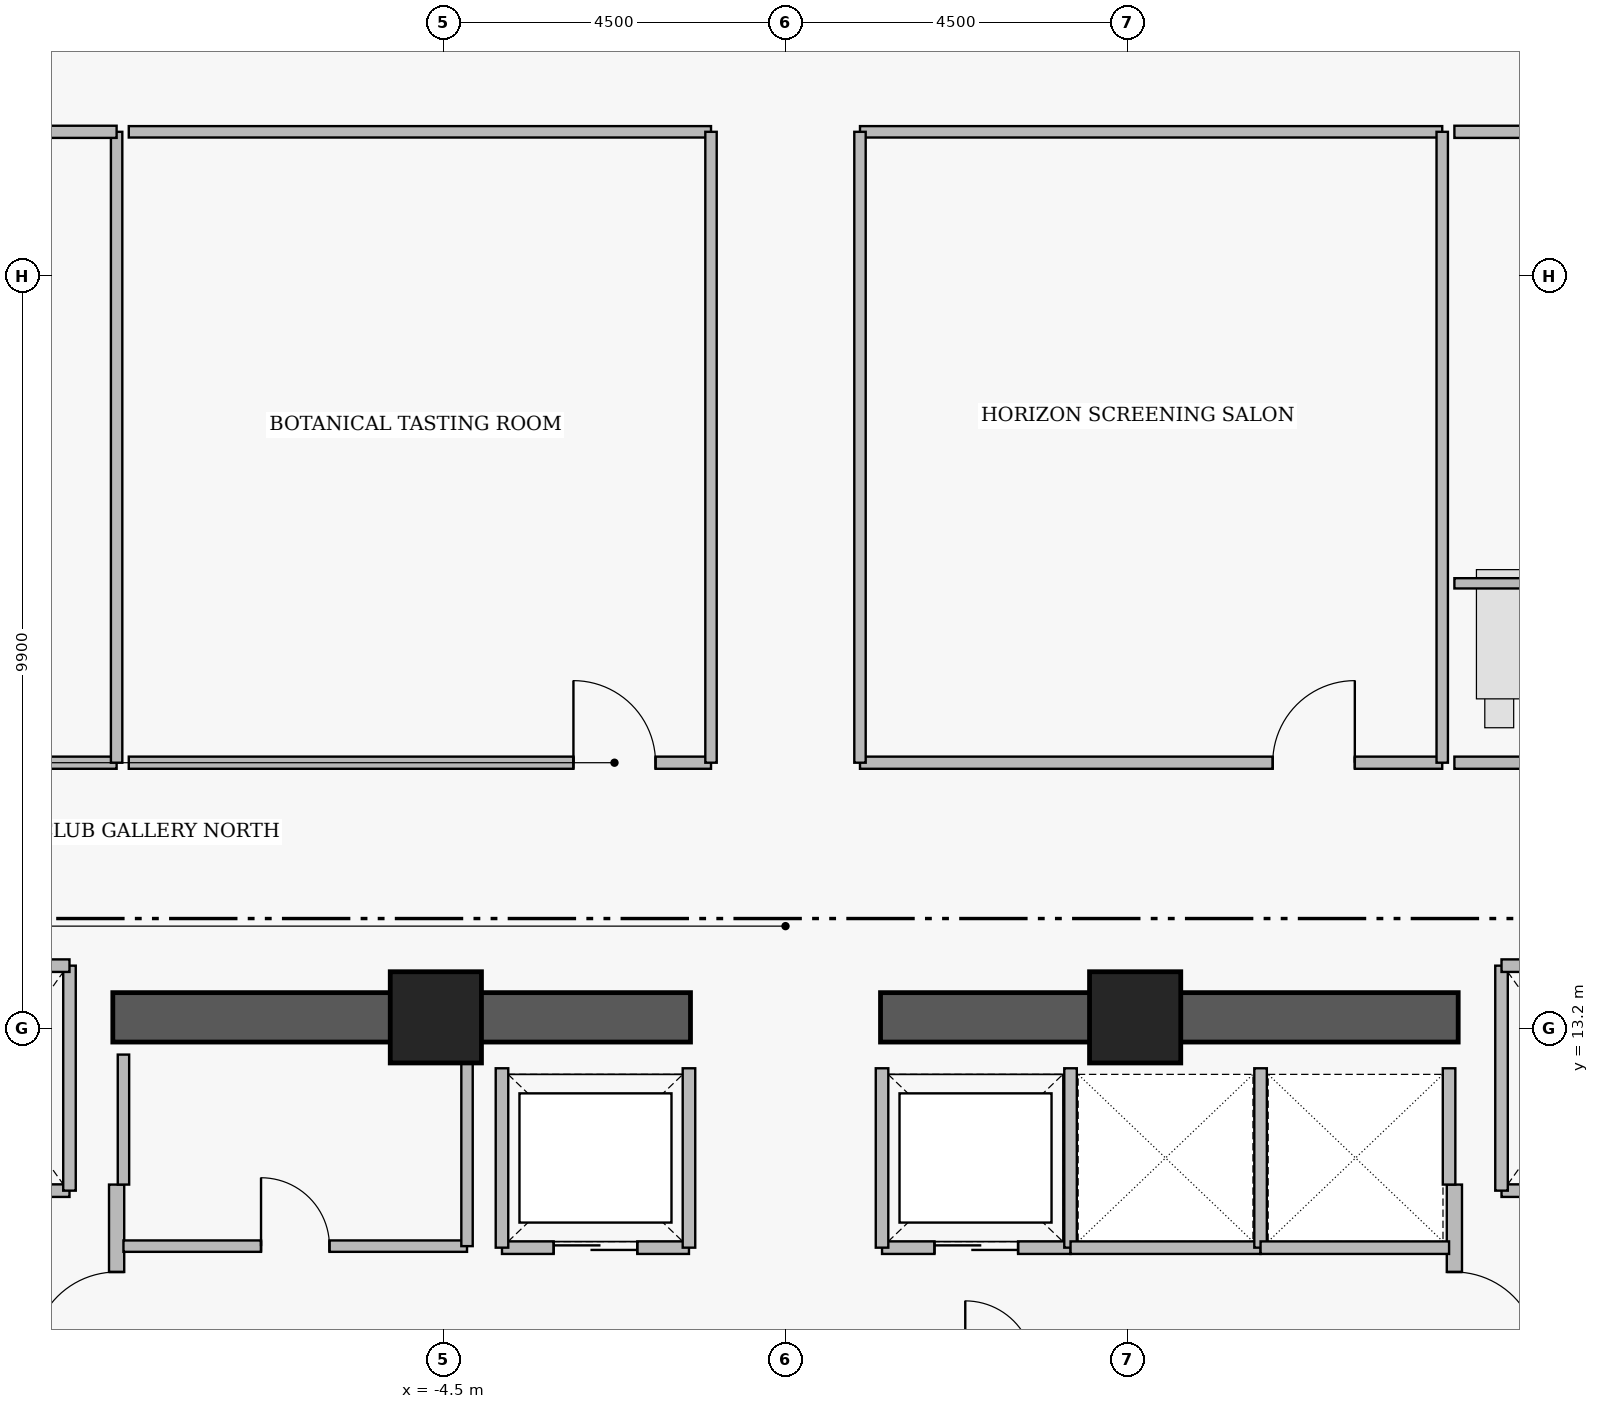
"""IFC4 building model, lengths in metres.
Left out: names, types, materials, properties, quantities, classifications, styles, units other than length and angle.
Written with IfcOpenShell. Run it as: python <this file> out.ifc"""

import sys

from ifc_helpers import new_model, si_unit, direction, frame, frame_2d, origin, origin_2d, place, context, subcontext, project, spatial, rectangle, extrude, element, fill, save


model = new_model("IFC4")
c1 = context("Model", 3, precision=1e-05, world=origin(), true_north=direction((0.0, 1.0)))
c2 = subcontext(c1, "Body", "Model", "MODEL_VIEW")
j1 = project(units=[si_unit("LENGTHUNIT", "METRE"), si_unit("PLANEANGLEUNIT", "RADIAN")], contexts=[c1])
p1 = place(None, origin())
s1 = spatial("IfcSite", under=j1, at=p1, CompositionType="ELEMENT")
p2 = place(p1, origin())
s2 = spatial("IfcBuilding", under=s1, at=p2, CompositionType="ELEMENT")
p3 = place(p2, frame((0.0, 0.0, 199.9)))
s3 = spatial("IfcBuildingStorey", under=s2, at=p3, CompositionType="ELEMENT", Elevation=199.9)
for number, where, z_axis, x_axis in (
    (1, (-8.85, 13.35, 0.0), (0.0, 0.0, 1.0), (1.0, 0.0, 0.0)),
    (2, (1.25, 13.35, 0.0), (0.0, 0.0, 1.0), (1.0, 0.0, 0.0)),
):
    element("IfcWall", number, at=place(p3, frame(where, z_axis=z_axis, x_axis=x_axis)), inside=s3, PredefinedType="SHEAR", context=c2, shape_type="SweptSolid", body=[
        extrude(rectangle(XDim=7.6, YDim=0.65, at=frame_2d((3.8, 0.0))), origin(), (0.0, 0.0, 1.0), 3.53),
    ])
for number, where, z_axis, x_axis in (
    (3, (-4.6, 13.35, 0.0), (0.0, 0.0, 1.0), (1.0, 0.0, 0.0)),
    (4, (4.6, 13.35, 0.0), (0.0, 0.0, 1.0), (1.0, 0.0, 0.0)),
):
    element("IfcColumn", number, at=place(p3, frame(where, z_axis=z_axis, x_axis=x_axis)), inside=s3, PredefinedType="COLUMN", context=c2, shape_type="SweptSolid", body=[
        extrude(rectangle(XDim=1.2, YDim=1.2, at=origin_2d()), origin(), (0.0, 0.0, 1.0), 3.75),
    ])
p4 = place(p3, frame((-8.8, 5.05, 0.0), z_axis=(0.0, 0.0, 1.0), x_axis=(0.0, 1.0, 0.0)))
e5 = element("IfcWall", 5, at=p4, inside=s3, PredefinedType="PARTITIONING", context=c2, shape_type="SweptSolid", body=[
    extrude(rectangle(XDim=6.1, YDim=0.2, at=frame_2d((3.05, 0.0))), origin(), (0.0, 0.0, 1.0), 3.53),
])
p5 = place(p4, frame((0.25, 0.0, 0.0)))
e6 = element("IfcOpeningElement", 6, at=p5, cuts=e5, PredefinedType="OPENING", context=c2, shape_type="SweptSolid", body=[
    extrude(rectangle(XDim=1.1, YDim=2.2, at=frame_2d((0.55, 1.1))), frame((0.0, 0.11, 0.0), z_axis=(0.0, -1.0, 0.0), x_axis=(1.0, 0.0, 0.0)), (0.0, 0.0, 1.0), 0.22),
])
p6 = place(p4, frame((3.85, 0.0, 0.0)))
e7 = element("IfcOpeningElement", 7, at=p6, cuts=e5, PredefinedType="OPENING", context=c2, shape_type="SweptSolid", body=[
    extrude(rectangle(XDim=1.1, YDim=2.2, at=frame_2d((0.55, 1.1))), frame((0.0, 0.11, 0.0), z_axis=(0.0, -1.0, 0.0), x_axis=(1.0, 0.0, 0.0)), (0.0, 0.0, 1.0), 0.22),
])
p7 = place(p3, frame((8.8, 11.15, 0.0), z_axis=(0.0, 0.0, 1.0), x_axis=(0.0, -1.0, 0.0)))
e8 = element("IfcWall", 8, at=p7, inside=s3, PredefinedType="PARTITIONING", context=c2, shape_type="SweptSolid", body=[
    extrude(rectangle(XDim=6.1, YDim=0.2, at=frame_2d((3.05, 0.0))), origin(), (0.0, 0.0, 1.0), 3.53),
])
p8 = place(p7, frame((1.15, 0.0, 0.0)))
e9 = element("IfcOpeningElement", 9, at=p8, cuts=e8, PredefinedType="OPENING", context=c2, shape_type="SweptSolid", body=[
    extrude(rectangle(XDim=1.1, YDim=2.2, at=frame_2d((0.55, 1.1))), frame((0.0, 0.11, 0.0), z_axis=(0.0, -1.0, 0.0), x_axis=(1.0, 0.0, 0.0)), (0.0, 0.0, 1.0), 0.22),
])
p9 = place(p7, frame((4.75, 0.0, 0.0)))
e10 = element("IfcOpeningElement", 10, at=p9, cuts=e8, PredefinedType="OPENING", context=c2, shape_type="SweptSolid", body=[
    extrude(rectangle(XDim=1.1, YDim=2.2, at=frame_2d((0.55, 1.1))), frame((0.0, 0.11, 0.0), z_axis=(0.0, -1.0, 0.0), x_axis=(1.0, 0.0, 0.0)), (0.0, 0.0, 1.0), 0.22),
])
p10 = place(p3, frame((-11.58, 11.07, 0.0), z_axis=(0.0, 0.0, 1.0), x_axis=(1.0, 0.0, 0.0)))
e11 = element("IfcWall", 11, at=p10, inside=s3, PredefinedType="PARTITIONING", context=c2, shape_type="SweptSolid", body=[
    extrude(rectangle(XDim=2.16, YDim=0.165, at=frame_2d((1.08, 0.0))), origin(), (0.0, 0.0, 1.0), 3.53),
])
p11 = place(p10, frame((0.53, 0.0, 0.0)))
e12 = element("IfcOpeningElement", 12, at=p11, cuts=e11, PredefinedType="OPENING", context=c2, shape_type="SweptSolid", body=[
    extrude(rectangle(XDim=1.15, YDim=2.25, at=frame_2d((0.575, 1.125))), frame((0.0, 0.093, 0.0), z_axis=(0.0, -1.0, 0.0), x_axis=(1.0, 0.0, 0.0)), (0.0, 0.0, 1.0), 0.185),
])
p12 = place(p3, frame((9.42, 11.07, 0.0), z_axis=(0.0, 0.0, 1.0), x_axis=(1.0, 0.0, 0.0)))
e13 = element("IfcWall", 13, at=p12, inside=s3, PredefinedType="PARTITIONING", context=c2, shape_type="SweptSolid", body=[
    extrude(rectangle(XDim=2.16, YDim=0.165, at=frame_2d((1.08, 0.0))), origin(), (0.0, 0.0, 1.0), 3.53),
])
p13 = place(p12, frame((0.53, 0.0, 0.0)))
e14 = element("IfcOpeningElement", 14, at=p13, cuts=e13, PredefinedType="OPENING", context=c2, shape_type="SweptSolid", body=[
    extrude(rectangle(XDim=1.15, YDim=2.25, at=frame_2d((0.575, 1.125))), frame((0.0, 0.093, 0.0), z_axis=(0.0, -1.0, 0.0), x_axis=(1.0, 0.0, 0.0)), (0.0, 0.0, 1.0), 0.185),
])
p14 = place(p3, frame((-3.73, 10.32, 0.0), z_axis=(0.0, 0.0, 1.0), x_axis=(1.0, 0.0, 0.0)))
e15 = element("IfcWall", 15, at=p14, inside=s3, PredefinedType="PARTITIONING", context=c2, shape_type="SweptSolid", body=[
    extrude(rectangle(XDim=2.46, YDim=0.165, at=frame_2d((1.23, 0.0))), origin(), (0.0, 0.0, 1.0), 3.53),
])
p15 = place(p14, frame((0.68, 0.0, 0.0)))
e16 = element("IfcOpeningElement", 16, at=p15, cuts=e15, PredefinedType="OPENING", context=c2, shape_type="SweptSolid", body=[
    extrude(rectangle(XDim=1.1, YDim=2.25, at=frame_2d((0.55, 1.125))), frame((0.0, 0.093, 0.0), z_axis=(0.0, -1.0, 0.0), x_axis=(1.0, 0.0, 0.0)), (0.0, 0.0, 1.0), 0.185),
])
p16 = place(p3, frame((1.27, 10.32, 0.0), z_axis=(0.0, 0.0, 1.0), x_axis=(1.0, 0.0, 0.0)))
e17 = element("IfcWall", 17, at=p16, inside=s3, PredefinedType="PARTITIONING", context=c2, shape_type="SweptSolid", body=[
    extrude(rectangle(XDim=2.48, YDim=0.165, at=frame_2d((1.24, 0.0))), origin(), (0.0, 0.0, 1.0), 3.53),
])
p17 = place(p16, frame((0.69, 0.0, 0.0)))
e18 = element("IfcOpeningElement", 18, at=p17, cuts=e17, PredefinedType="OPENING", context=c2, shape_type="SweptSolid", body=[
    extrude(rectangle(XDim=1.1, YDim=2.25, at=frame_2d((0.55, 1.125))), frame((0.0, 0.093, 0.0), z_axis=(0.0, -1.0, 0.0), x_axis=(1.0, 0.0, 0.0)), (0.0, 0.0, 1.0), 0.185),
])
p18 = place(p3, frame((-8.71, 10.34, 0.0), z_axis=(0.0, 0.0, 1.0), x_axis=(1.0, 0.0, 0.0)))
e19 = element("IfcWall", 19, at=p18, inside=s3, PredefinedType="PARTITIONING", context=c2, shape_type="SweptSolid", body=[
    extrude(rectangle(XDim=4.52, YDim=0.15, at=frame_2d((2.26, 0.0))), origin(), (0.0, 0.0, 1.0), 3.53),
])
p19 = place(p18, frame((1.81, 0.0, 0.0)))
e20 = element("IfcOpeningElement", 20, at=p19, cuts=e19, PredefinedType="OPENING", context=c2, shape_type="SweptSolid", body=[
    extrude(rectangle(XDim=0.9, YDim=2.15, at=frame_2d((0.45, 1.075))), frame((0.0, 0.085, 0.0), z_axis=(0.0, -1.0, 0.0), x_axis=(1.0, 0.0, 0.0)), (0.0, 0.0, 1.0), 0.17),
])
p20 = place(p3, frame((-22.04, 16.7, 0.0), z_axis=(0.0, 0.0, 1.0), x_axis=(1.0, 0.0, 0.0)))
e21 = element("IfcWall", 21, at=p20, inside=s3, PredefinedType="PARTITIONING", context=c2, shape_type="SweptSolid", body=[
    extrude(rectangle(XDim=13.24, YDim=0.16, at=frame_2d((6.62, 0.0))), origin(), (0.0, 0.0, 1.0), 3.124),
])
p21 = place(p20, frame((7.365, 0.0, 0.0)))
e22 = element("IfcOpeningElement", 22, at=p21, cuts=e21, PredefinedType="OPENING", context=c2, shape_type="SweptSolid", body=[
    extrude(rectangle(XDim=1.0, YDim=2.15, at=frame_2d((0.5, 1.075))), frame((0.0, 0.09, 0.0), z_axis=(0.0, -1.0, 0.0), x_axis=(1.0, 0.0, 0.0)), (0.0, 0.0, 1.0), 0.18),
])
p22 = place(p3, frame((-8.64, 16.7, 0.0), z_axis=(0.0, 0.0, 1.0), x_axis=(1.0, 0.0, 0.0)))
e23 = element("IfcWall", 23, at=p22, inside=s3, PredefinedType="PARTITIONING", context=c2, shape_type="SweptSolid", body=[
    extrude(rectangle(XDim=7.66, YDim=0.16, at=frame_2d((3.83, 0.0))), origin(), (0.0, 0.0, 1.0), 3.124),
])
p23 = place(p22, frame((5.85, 0.0, 0.0)))
e24 = element("IfcOpeningElement", 24, at=p23, cuts=e23, PredefinedType="OPENING", context=c2, shape_type="SweptSolid", body=[
    extrude(rectangle(XDim=1.08, YDim=2.18, at=frame_2d((0.54, 1.09))), frame((0.0, 0.09, 0.0), z_axis=(0.0, -1.0, 0.0), x_axis=(1.0, 0.0, 0.0)), (0.0, 0.0, 1.0), 0.18),
])
p24 = place(p3, frame((0.98, 16.7, 0.0), z_axis=(0.0, 0.0, 1.0), x_axis=(1.0, 0.0, 0.0)))
e25 = element("IfcWall", 25, at=p24, inside=s3, PredefinedType="PARTITIONING", context=c2, shape_type="SweptSolid", body=[
    extrude(rectangle(XDim=7.66, YDim=0.16, at=frame_2d((3.83, 0.0))), origin(), (0.0, 0.0, 1.0), 3.124),
])
p25 = place(p24, frame((5.43, 0.0, 0.0)))
e26 = element("IfcOpeningElement", 26, at=p25, cuts=e25, PredefinedType="OPENING", context=c2, shape_type="SweptSolid", body=[
    extrude(rectangle(XDim=1.08, YDim=2.18, at=frame_2d((0.54, 1.09))), frame((0.0, 0.09, 0.0), z_axis=(0.0, -1.0, 0.0), x_axis=(1.0, 0.0, 0.0)), (0.0, 0.0, 1.0), 0.18),
])
p26 = place(p3, frame((8.8, 16.7, 0.0), z_axis=(0.0, 0.0, 1.0), x_axis=(1.0, 0.0, 0.0)))
e27 = element("IfcWall", 27, at=p26, inside=s3, PredefinedType="PARTITIONING", context=c2, shape_type="SweptSolid", body=[
    extrude(rectangle(XDim=13.24, YDim=0.16, at=frame_2d((6.62, 0.0))), origin(), (0.0, 0.0, 1.0), 3.124),
])
p27 = place(p26, frame((6.025, 0.0, 0.0)))
e28 = element("IfcOpeningElement", 28, at=p27, cuts=e27, PredefinedType="OPENING", context=c2, shape_type="SweptSolid", body=[
    extrude(rectangle(XDim=1.0, YDim=2.15, at=frame_2d((0.5, 1.075))), frame((0.0, 0.09, 0.0), z_axis=(0.0, -1.0, 0.0), x_axis=(1.0, 0.0, 0.0)), (0.0, 0.0, 1.0), 0.18),
])
p28 = place(p3, frame((-9.42, 11.07, 0.0), z_axis=(0.0, 0.0, 1.0), x_axis=(0.0, 1.0, 0.0)))
e29 = element("IfcWall", 29, at=p28, inside=s3, PredefinedType="PARTITIONING", context=c2, shape_type="SweptSolid", body=[
    extrude(rectangle(XDim=2.96, YDim=0.165, at=frame_2d((1.48, 0.0))), origin(), (0.0, 0.0, 1.0), 3.53),
])
p29 = place(p3, frame((-11.58, 14.03, 0.0), z_axis=(0.0, 0.0, 1.0), x_axis=(1.0, 0.0, 0.0)))
e30 = element("IfcWall", 30, at=p29, inside=s3, PredefinedType="PARTITIONING", context=c2, shape_type="SweptSolid", body=[
    extrude(rectangle(XDim=2.16, YDim=0.165, at=frame_2d((1.08, 0.0))), origin(), (0.0, 0.0, 1.0), 3.53),
])
p30 = place(p3, frame((9.42, 11.07, 0.0), z_axis=(0.0, 0.0, 1.0), x_axis=(0.0, 1.0, 0.0)))
e31 = element("IfcWall", 31, at=p30, inside=s3, PredefinedType="PARTITIONING", context=c2, shape_type="SweptSolid", body=[
    extrude(rectangle(XDim=2.96, YDim=0.165, at=frame_2d((1.48, 0.0))), origin(), (0.0, 0.0, 1.0), 3.53),
])
p31 = place(p3, frame((9.42, 14.03, 0.0), z_axis=(0.0, 0.0, 1.0), x_axis=(1.0, 0.0, 0.0)))
e32 = element("IfcWall", 32, at=p31, inside=s3, PredefinedType="PARTITIONING", context=c2, shape_type="SweptSolid", body=[
    extrude(rectangle(XDim=2.16, YDim=0.165, at=frame_2d((1.08, 0.0))), origin(), (0.0, 0.0, 1.0), 3.53),
])
for number, where, z_axis, x_axis in (
    (33, (-3.73, 10.32, 0.0), (0.0, 0.0, 1.0), (0.0, 1.0, 0.0)),
    (34, (-1.27, 10.32, 0.0), (0.0, 0.0, 1.0), (0.0, 1.0, 0.0)),
    (35, (1.27, 10.32, 0.0), (0.0, 0.0, 1.0), (0.0, 1.0, 0.0)),
    (36, (3.75, 10.32, 0.0), (0.0, 0.0, 1.0), (0.0, 1.0, 0.0)),
):
    element("IfcWall", number, at=place(p3, frame(where, z_axis=z_axis, x_axis=x_axis)), inside=s3, PredefinedType="PARTITIONING", context=c2, shape_type="SweptSolid", body=[
        extrude(rectangle(XDim=2.36, YDim=0.165, at=frame_2d((1.18, 0.0))), origin(), (0.0, 0.0, 1.0), 3.53),
    ])
p32 = place(p3, frame((3.75, 10.32, 0.0), z_axis=(0.0, 0.0, 1.0), x_axis=(1.0, 0.0, 0.0)))
e37 = element("IfcWall", 37, at=p32, inside=s3, PredefinedType="PARTITIONING", context=c2, shape_type="SweptSolid", body=[
    extrude(rectangle(XDim=2.5, YDim=0.165, at=frame_2d((1.25, 0.0))), origin(), (0.0, 0.0, 1.0), 3.53),
])
p33 = place(p3, frame((6.25, 10.32, 0.0), z_axis=(0.0, 0.0, 1.0), x_axis=(0.0, 1.0, 0.0)))
e38 = element("IfcWall", 38, at=p33, inside=s3, PredefinedType="PARTITIONING", context=c2, shape_type="SweptSolid", body=[
    extrude(rectangle(XDim=2.36, YDim=0.165, at=frame_2d((1.18, 0.0))), origin(), (0.0, 0.0, 1.0), 3.53),
])
p34 = place(p3, frame((6.25, 10.32, 0.0), z_axis=(0.0, 0.0, 1.0), x_axis=(1.0, 0.0, 0.0)))
e39 = element("IfcWall", 39, at=p34, inside=s3, PredefinedType="PARTITIONING", context=c2, shape_type="SweptSolid", body=[
    extrude(rectangle(XDim=2.48, YDim=0.165, at=frame_2d((1.24, 0.0))), origin(), (0.0, 0.0, 1.0), 3.53),
])
p35 = place(p3, frame((8.73, 11.15, 0.0), z_axis=(0.0, 0.0, 1.0), x_axis=(0.0, 1.0, 0.0)))
e40 = element("IfcWall", 40, at=p35, inside=s3, PredefinedType="PARTITIONING", context=c2, shape_type="SweptSolid", body=[
    extrude(rectangle(XDim=1.53, YDim=0.165, at=frame_2d((0.765, 0.0))), origin(), (0.0, 0.0, 1.0), 3.53),
])
p36 = place(p3, frame((-8.71, 11.15, 0.0), z_axis=(0.0, 0.0, 1.0), x_axis=(0.0, 1.0, 0.0)))
e41 = element("IfcWall", 41, at=p36, inside=s3, PredefinedType="PARTITIONING", context=c2, shape_type="SweptSolid", body=[
    extrude(rectangle(XDim=1.71, YDim=0.15, at=frame_2d((0.855, 0.0))), origin(), (0.0, 0.0, 1.0), 3.53),
])
p37 = place(p3, frame((-4.19, 10.34, 0.0), z_axis=(0.0, 0.0, 1.0), x_axis=(0.0, 1.0, 0.0)))
e42 = element("IfcWall", 42, at=p37, inside=s3, PredefinedType="PARTITIONING", context=c2, shape_type="SweptSolid", body=[
    extrude(rectangle(XDim=2.52, YDim=0.15, at=frame_2d((1.26, 0.0))), origin(), (0.0, 0.0, 1.0), 3.53),
])
p38 = place(p3, frame((-8.8, 16.7, 0.0), z_axis=(0.0, 0.0, 1.0), x_axis=(0.0, 1.0, 0.0)))
e43 = element("IfcWall", 43, at=p38, inside=s3, PredefinedType="PARTITIONING", context=c2, shape_type="SweptSolid", body=[
    extrude(rectangle(XDim=8.3, YDim=0.15, at=frame_2d((4.15, 0.0))), origin(), (0.0, 0.0, 1.0), 3.53),
])
p39 = place(p3, frame((-22.04, 25.0, 0.0), z_axis=(0.0, 0.0, 1.0), x_axis=(1.0, 0.0, 0.0)))
e44 = element("IfcWall", 44, at=p39, inside=s3, PredefinedType="PARTITIONING", context=c2, shape_type="SweptSolid", body=[
    extrude(rectangle(XDim=13.24, YDim=0.16, at=frame_2d((6.62, 0.0))), origin(), (0.0, 0.0, 1.0), 3.124),
])
p40 = place(p3, frame((-8.64, 25.0, 0.0), z_axis=(0.0, 0.0, 1.0), x_axis=(1.0, 0.0, 0.0)))
e45 = element("IfcWall", 45, at=p40, inside=s3, PredefinedType="PARTITIONING", context=c2, shape_type="SweptSolid", body=[
    extrude(rectangle(XDim=7.66, YDim=0.15, at=frame_2d((3.83, 0.0))), origin(), (0.0, 0.0, 1.0), 3.124),
])
p41 = place(p3, frame((-0.98, 16.7, 0.0), z_axis=(0.0, 0.0, 1.0), x_axis=(0.0, 1.0, 0.0)))
e46 = element("IfcWall", 46, at=p41, inside=s3, PredefinedType="PARTITIONING", context=c2, shape_type="SweptSolid", body=[
    extrude(rectangle(XDim=8.3, YDim=0.15, at=frame_2d((4.15, 0.0))), origin(), (0.0, 0.0, 1.0), 3.53),
])
p42 = place(p3, frame((0.98, 25.0, 0.0), z_axis=(0.0, 0.0, 1.0), x_axis=(1.0, 0.0, 0.0)))
e47 = element("IfcWall", 47, at=p42, inside=s3, PredefinedType="PARTITIONING", context=c2, shape_type="SweptSolid", body=[
    extrude(rectangle(XDim=7.66, YDim=0.15, at=frame_2d((3.83, 0.0))), origin(), (0.0, 0.0, 1.0), 3.124),
])
for number, where, z_axis, x_axis in (
    (48, (0.98, 16.7, 0.0), (0.0, 0.0, 1.0), (0.0, 1.0, 0.0)),
    (49, (8.64, 16.7, 0.0), (0.0, 0.0, 1.0), (0.0, 1.0, 0.0)),
):
    element("IfcWall", number, at=place(p3, frame(where, z_axis=z_axis, x_axis=x_axis)), inside=s3, PredefinedType="PARTITIONING", context=c2, shape_type="SweptSolid", body=[
        extrude(rectangle(XDim=8.3, YDim=0.15, at=frame_2d((4.15, 0.0))), origin(), (0.0, 0.0, 1.0), 3.53),
    ])
p43 = place(p3, frame((8.8, 19.06, 0.0), z_axis=(0.0, 0.0, 1.0), x_axis=(1.0, 0.0, 0.0)))
e50 = element("IfcWall", 50, at=p43, inside=s3, PredefinedType="PLUMBINGWALL", context=c2, shape_type="SweptSolid", body=[
    extrude(rectangle(XDim=2.26, YDim=0.135, at=frame_2d((1.13, 0.0))), origin(), (0.0, 0.0, 1.0), 3.124),
])
p44 = place(p3, frame((8.8, 25.0, 0.0), z_axis=(0.0, 0.0, 1.0), x_axis=(1.0, 0.0, 0.0)))
e51 = element("IfcWall", 51, at=p44, inside=s3, PredefinedType="PARTITIONING", context=c2, shape_type="SweptSolid", body=[
    extrude(rectangle(XDim=13.24, YDim=0.16, at=frame_2d((6.62, 0.0))), origin(), (0.0, 0.0, 1.0), 3.124),
])
p45 = place(p6, origin())
e52 = element("IfcDoor", 52, at=p45, inside=s3, OperationType="SINGLE_SWING_LEFT", PredefinedType="DOOR", context=c2, shape_type="SweptSolid", body=[
    extrude(rectangle(XDim=1.1, YDim=2.2, at=frame_2d((0.55, 1.1))), frame((0.0, 0.025, 0.0), z_axis=(0.0, -1.0, 0.0), x_axis=(1.0, 0.0, 0.0)), (0.0, 0.0, 1.0), 0.05),
])
fill(e7, e52)
p46 = place(p8, origin())
e53 = element("IfcDoor", 53, at=p46, inside=s3, OperationType="SINGLE_SWING_RIGHT", PredefinedType="DOOR", context=c2, shape_type="SweptSolid", body=[
    extrude(rectangle(XDim=1.1, YDim=2.2, at=frame_2d((0.55, 1.1))), frame((0.0, 0.025, 0.0), z_axis=(0.0, -1.0, 0.0), x_axis=(1.0, 0.0, 0.0)), (0.0, 0.0, 1.0), 0.05),
])
fill(e9, e53)
p47 = place(p15, origin())
e54 = element("IfcDoor", 54, at=p47, inside=s3, OperationType="SLIDING_TO_LEFT", PredefinedType="DOOR", context=c2, shape_type="SweptSolid", body=[
    extrude(rectangle(XDim=1.1, YDim=2.25, at=frame_2d((0.55, 1.125))), frame((0.0, 0.025, 0.0), z_axis=(0.0, -1.0, 0.0), x_axis=(1.0, 0.0, 0.0)), (0.0, 0.0, 1.0), 0.05),
])
fill(e16, e54)
p48 = place(p17, origin())
e55 = element("IfcDoor", 55, at=p48, inside=s3, OperationType="SLIDING_TO_LEFT", PredefinedType="DOOR", context=c2, shape_type="SweptSolid", body=[
    extrude(rectangle(XDim=1.1, YDim=2.25, at=frame_2d((0.55, 1.125))), frame((0.0, 0.025, 0.0), z_axis=(0.0, -1.0, 0.0), x_axis=(1.0, 0.0, 0.0)), (0.0, 0.0, 1.0), 0.05),
])
fill(e18, e55)
p49 = place(p19, origin())
e56 = element("IfcDoor", 56, at=p49, inside=s3, OperationType="SINGLE_SWING_LEFT", PredefinedType="DOOR", context=c2, shape_type="SweptSolid", body=[
    extrude(rectangle(XDim=0.9, YDim=2.15, at=frame_2d((0.45, 1.075))), frame((0.0, 0.025, 0.0), z_axis=(0.0, -1.0, 0.0), x_axis=(1.0, 0.0, 0.0)), (0.0, 0.0, 1.0), 0.05),
])
fill(e20, e56)
p50 = place(p23, origin())
e57 = element("IfcDoor", 57, at=p50, inside=s3, OperationType="SINGLE_SWING_LEFT", PredefinedType="DOOR", context=c2, shape_type="SweptSolid", body=[
    extrude(rectangle(XDim=1.08, YDim=2.18, at=frame_2d((0.54, 1.09))), frame((0.0, 0.025, 0.0), z_axis=(0.0, -1.0, 0.0), x_axis=(1.0, 0.0, 0.0)), (0.0, 0.0, 1.0), 0.05),
])
fill(e24, e57)
p51 = place(p25, origin())
e58 = element("IfcDoor", 58, at=p51, inside=s3, OperationType="SINGLE_SWING_RIGHT", PredefinedType="DOOR", context=c2, shape_type="SweptSolid", body=[
    extrude(rectangle(XDim=1.08, YDim=2.18, at=frame_2d((0.54, 1.09))), frame((0.0, 0.025, 0.0), z_axis=(0.0, -1.0, 0.0), x_axis=(1.0, 0.0, 0.0)), (0.0, 0.0, 1.0), 0.05),
])
fill(e26, e58)
save(model, sys.argv[1])
